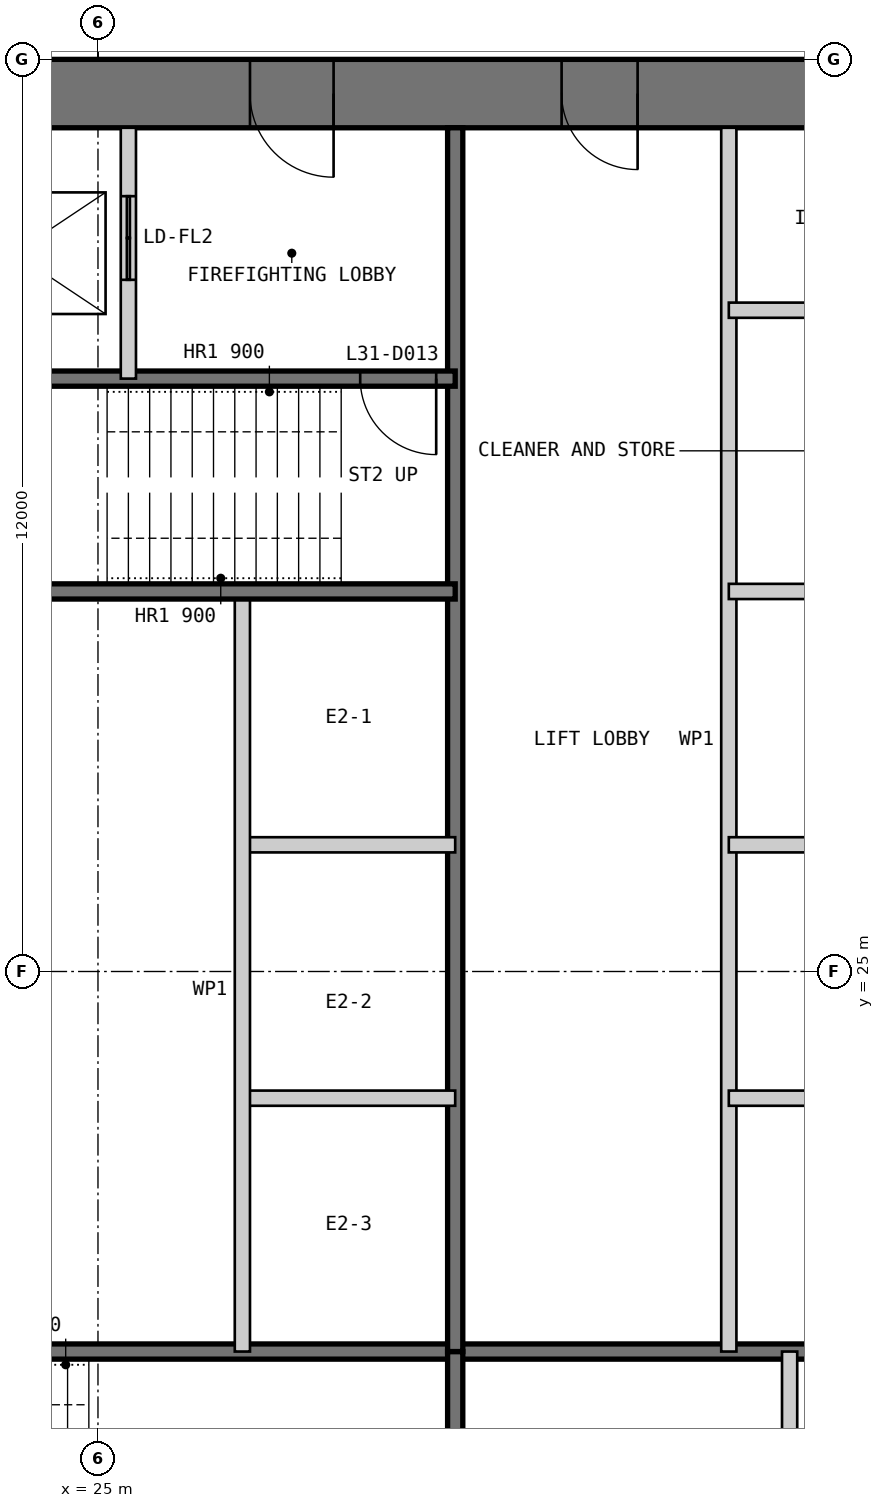
"""IFC4 building model, lengths in metres.
Left out: names, types, materials, properties, quantities, classifications, styles, units other than length and angle.
Written with IfcOpenShell. Run it as: python <this file> out.ifc"""

import sys

from ifc_helpers import new_model, si_unit, direction, frame, frame_2d, origin, place, context, subcontext, project, spatial, polyline, rectangle, outline, extrude, element, fill, save


model = new_model("IFC4")
c1 = context("Model", 3, precision=1e-05, world=origin(), true_north=direction((0.0, 1.0)))
c2 = subcontext(c1, "Body", "Model", "MODEL_VIEW")
j1 = project(units=[si_unit("LENGTHUNIT", "METRE"), si_unit("PLANEANGLEUNIT", "RADIAN")], contexts=[c1])
p1 = place(None, origin())
s1 = spatial("IfcSite", under=j1, at=p1, CompositionType="ELEMENT")
p2 = place(p1, origin())
s2 = spatial("IfcBuilding", under=s1, at=p2, CompositionType="ELEMENT")
p3 = place(p2, frame((0.0, 0.0, 134.4)))
s3 = spatial("IfcBuildingStorey", under=s2, at=p3, CompositionType="ELEMENT", Elevation=134.4)
p4 = place(p3, frame((37.0, 36.55, 0.0), z_axis=(0.0, 0.0, 1.0), x_axis=(-1.0, 0.0, 0.0)))
e1 = element("IfcWall", 1, at=p4, inside=s3, PredefinedType="SHEAR", context=c2, shape_type="SweptSolid", body=[
    extrude(outline(polyline([(0.0, -0.45), (24.0, -0.45), (23.1, 0.45), (0.9, 0.45), (0.0, -0.45)])), origin(), (0.0, 0.0, 1.0), 4.0),
])
p5 = place(p4, frame((4.9, 0.0, 0.0)))
e2 = element("IfcOpeningElement", 2, at=p5, cuts=e1, PredefinedType="OPENING", context=c2, shape_type="SweptSolid", body=[
    extrude(rectangle(XDim=1.0, YDim=2.2, at=frame_2d((0.5, 1.1))), frame((0.0, 0.46, 0.0), z_axis=(0.0, -1.0, 0.0), x_axis=(1.0, 0.0, 0.0)), (0.0, 0.0, 1.0), 0.92),
])
p6 = place(p4, frame((8.9, 0.0, 0.0)))
e3 = element("IfcOpeningElement", 3, at=p6, cuts=e1, PredefinedType="OPENING", context=c2, shape_type="SweptSolid", body=[
    extrude(rectangle(XDim=1.1, YDim=2.2, at=frame_2d((0.55, 1.1))), frame((0.0, 0.46, 0.0), z_axis=(0.0, -1.0, 0.0), x_axis=(1.0, 0.0, 0.0)), (0.0, 0.0, 1.0), 0.92),
])
p7 = place(p4, frame((15.05, 0.0, 0.0)))
e4 = element("IfcOpeningElement", 4, at=p7, cuts=e1, PredefinedType="OPENING", context=c2, shape_type="SweptSolid", body=[
    extrude(rectangle(XDim=0.9, YDim=2.2, at=frame_2d((0.45, 1.1))), frame((0.0, 0.46, 0.0), z_axis=(0.0, -1.0, 0.0), x_axis=(1.0, 0.0, 0.0)), (0.0, 0.0, 1.0), 0.92),
])
p8 = place(p4, frame((17.9, 0.0, 0.0)))
e5 = element("IfcOpeningElement", 5, at=p8, cuts=e1, PredefinedType="OPENING", context=c2, shape_type="SweptSolid", body=[
    extrude(rectangle(XDim=1.0, YDim=2.2, at=frame_2d((0.5, 1.1))), frame((0.0, 0.46, 0.0), z_axis=(0.0, -1.0, 0.0), x_axis=(1.0, 0.0, 0.0)), (0.0, 0.0, 1.0), 0.92),
])
p9 = place(p4, frame((21.4, 0.0, 0.0)))
e6 = element("IfcOpeningElement", 6, at=p9, cuts=e1, PredefinedType="OPENING", context=c2, shape_type="SweptSolid", body=[
    extrude(rectangle(XDim=1.0, YDim=2.2, at=frame_2d((0.5, 1.1))), frame((0.0, 0.46, 0.0), z_axis=(0.0, -1.0, 0.0), x_axis=(1.0, 0.0, 0.0)), (0.0, 0.0, 1.0), 0.92),
])
p10 = place(p3, frame((20.3, 20.0, 0.0), z_axis=(0.0, 0.0, 1.0), x_axis=(1.0, 0.0, 0.0)))
e7 = element("IfcWall", 7, at=p10, inside=s3, PredefinedType="SOLIDWALL", context=c2, shape_type="SweptSolid", body=[
    extrude(rectangle(XDim=15.8, YDim=0.2, at=frame_2d((7.9, 0.0))), origin(), (0.0, 0.0, 1.0), 3.8),
])
p11 = place(p3, frame((29.7, 13.9, 0.0), z_axis=(0.0, 0.0, 1.0), x_axis=(0.0, 1.0, 0.0)))
e8 = element("IfcWall", 8, at=p11, inside=s3, PredefinedType="SOLIDWALL", context=c2, shape_type="SweptSolid", body=[
    extrude(rectangle(XDim=6.1, YDim=0.2, at=frame_2d((3.05, 0.0))), origin(), (0.0, 0.0, 1.0), 3.8),
])
p12 = place(p3, frame((34.1, 13.9, 0.0), z_axis=(0.0, 0.0, 1.0), x_axis=(0.0, 1.0, 0.0)))
e9 = element("IfcWall", 9, at=p12, inside=s3, PredefinedType="PARTITIONING", context=c2, shape_type="SweptSolid", body=[
    extrude(rectangle(XDim=6.1, YDim=0.2, at=frame_2d((3.05, 0.0))), origin(), (0.0, 0.0, 1.0), 3.8),
])
p13 = place(p3, frame((33.3, 36.1, 0.0), z_axis=(0.0, 0.0, 1.0), x_axis=(0.0, -1.0, 0.0)))
e10 = element("IfcWall", 10, at=p13, inside=s3, PredefinedType="PARTITIONING", context=c2, shape_type="SweptSolid", body=[
    extrude(rectangle(XDim=16.1, YDim=0.2, at=frame_2d((8.05, 0.0))), origin(), (0.0, 0.0, 1.0), 3.8),
])
p14 = place(p3, frame((29.7, 36.1, 0.0), z_axis=(0.0, 0.0, 1.0), x_axis=(0.0, -1.0, 0.0)))
e11 = element("IfcWall", 11, at=p14, inside=s3, PredefinedType="SOLIDWALL", context=c2, shape_type="SweptSolid", body=[
    extrude(rectangle(XDim=16.1, YDim=0.2, at=frame_2d((8.05, 0.0))), origin(), (0.0, 0.0, 1.0), 3.8),
])
for number, where, z_axis, x_axis in (
    (12, (36.1, 30.0, 0.0), (0.0, 0.0, 1.0), (-1.0, 0.0, 0.0)),
    (13, (36.1, 26.667, 0.0), (0.0, 0.0, 1.0), (-1.0, 0.0, 0.0)),
    (14, (36.1, 23.333, 0.0), (0.0, 0.0, 1.0), (-1.0, 0.0, 0.0)),
    (15, (29.7, 26.667, 0.0), (0.0, 0.0, 1.0), (-1.0, 0.0, 0.0)),
    (16, (29.7, 23.333, 0.0), (0.0, 0.0, 1.0), (-1.0, 0.0, 0.0)),
):
    element("IfcWall", number, at=place(p3, frame(where, z_axis=z_axis, x_axis=x_axis)), inside=s3, PredefinedType="PARTITIONING", context=c2, shape_type="SweptSolid", body=[
        extrude(rectangle(XDim=2.8, YDim=0.2, at=frame_2d((1.4, 0.0))), origin(), (0.0, 0.0, 1.0), 3.8),
    ])
p15 = place(p3, frame((26.9, 30.0, 0.0), z_axis=(0.0, 0.0, 1.0), x_axis=(0.0, -1.0, 0.0)))
e17 = element("IfcWall", 17, at=p15, inside=s3, PredefinedType="PARTITIONING", context=c2, shape_type="SweptSolid", body=[
    extrude(rectangle(XDim=10.0, YDim=0.2, at=frame_2d((5.0, 0.0))), origin(), (0.0, 0.0, 1.0), 3.8),
])
p16 = place(p3, frame((29.7, 32.8, 0.0), z_axis=(0.0, 0.0, 1.0), x_axis=(-1.0, 0.0, 0.0)))
e18 = element("IfcWall", 18, at=p16, inside=s3, PredefinedType="SOLIDWALL", context=c2, shape_type="SweptSolid", body=[
    extrude(rectangle(XDim=9.4, YDim=0.2, at=frame_2d((4.7, 0.0))), origin(), (0.0, 0.0, 1.0), 3.8),
])
p17 = place(p16, frame((0.25, 0.0, 0.0)))
e19 = element("IfcOpeningElement", 19, at=p17, cuts=e18, PredefinedType="OPENING", context=c2, shape_type="SweptSolid", body=[
    extrude(rectangle(XDim=1.0, YDim=2.2, at=frame_2d((0.5, 1.1))), frame((0.0, 0.11, 0.0), z_axis=(0.0, -1.0, 0.0), x_axis=(1.0, 0.0, 0.0)), (0.0, 0.0, 1.0), 0.22),
])
p18 = place(p3, frame((29.7, 30.0, 0.0), z_axis=(0.0, 0.0, 1.0), x_axis=(-1.0, 0.0, 0.0)))
e20 = element("IfcWall", 20, at=p18, inside=s3, PredefinedType="SOLIDWALL", context=c2, shape_type="SweptSolid", body=[
    extrude(rectangle(XDim=15.8, YDim=0.2, at=frame_2d((7.9, 0.0))), origin(), (0.0, 0.0, 1.0), 3.8),
])
p19 = place(p3, frame((25.4, 36.1, 0.0), z_axis=(0.0, 0.0, 1.0), x_axis=(0.0, -1.0, 0.0)))
e21 = element("IfcWall", 21, at=p19, inside=s3, PredefinedType="PARTITIONING", context=c2, shape_type="SweptSolid", body=[
    extrude(rectangle(XDim=3.3, YDim=0.2, at=frame_2d((1.65, 0.0))), origin(), (0.0, 0.0, 1.0), 3.8),
])
p20 = place(p19, frame((0.9, 0.0, 0.0)))
e22 = element("IfcOpeningElement", 22, at=p20, cuts=e21, PredefinedType="OPENING", context=c2, shape_type="SweptSolid", body=[
    extrude(rectangle(XDim=1.1, YDim=2.2, at=frame_2d((0.55, 1.1))), frame((0.0, 0.11, 0.0), z_axis=(0.0, -1.0, 0.0), x_axis=(1.0, 0.0, 0.0)), (0.0, 0.0, 1.0), 0.22),
])
p21 = place(p3, frame((36.1, 33.7, 0.0), z_axis=(0.0, 0.0, 1.0), x_axis=(-1.0, 0.0, 0.0)))
e23 = element("IfcWall", 23, at=p21, inside=s3, PredefinedType="PARTITIONING", context=c2, shape_type="SweptSolid", body=[
    extrude(rectangle(XDim=2.8, YDim=0.2, at=frame_2d((1.4, 0.0))), origin(), (0.0, 0.0, 1.0), 3.8),
])
p22 = place(p5, origin())
e24 = element("IfcDoor", 24, at=p22, inside=s3, OperationType="SINGLE_SWING_LEFT", PredefinedType="DOOR", context=c2, shape_type="SweptSolid", body=[
    extrude(rectangle(XDim=1.0, YDim=2.2, at=frame_2d((0.5, 1.1))), frame((0.0, 0.025, 0.0), z_axis=(0.0, -1.0, 0.0), x_axis=(1.0, 0.0, 0.0)), (0.0, 0.0, 1.0), 0.05),
    extrude(outline(polyline([(0.0, 0.0), (0.04, 0.0), (0.04, 2.16), (0.96, 2.16), (0.96, 0.0), (1.0, 0.0), (1.0, 2.2), (0.0, 2.2), (0.0, 0.0)])), frame((0.0, 0.3, 0.0), z_axis=(0.0, -1.0, 0.0), x_axis=(1.0, 0.0, 0.0)), (0.0, 0.0, 1.0), 0.6),
])
fill(e2, e24)
p23 = place(p6, origin())
e25 = element("IfcDoor", 25, at=p23, inside=s3, OperationType="SINGLE_SWING_LEFT", PredefinedType="DOOR", context=c2, shape_type="SweptSolid", body=[
    extrude(rectangle(XDim=1.1, YDim=2.2, at=frame_2d((0.55, 1.1))), frame((0.0, 0.025, 0.0), z_axis=(0.0, -1.0, 0.0), x_axis=(1.0, 0.0, 0.0)), (0.0, 0.0, 1.0), 0.05),
    extrude(outline(polyline([(0.0, 0.0), (0.04, 0.0), (0.04, 2.16), (1.06, 2.16), (1.06, 0.0), (1.1, 0.0), (1.1, 2.2), (0.0, 2.2), (0.0, 0.0)])), frame((0.0, 0.3, 0.0), z_axis=(0.0, -1.0, 0.0), x_axis=(1.0, 0.0, 0.0)), (0.0, 0.0, 1.0), 0.6),
])
fill(e3, e25)
p24 = place(p17, origin())
e26 = element("IfcDoor", 26, at=p24, inside=s3, OperationType="SINGLE_SWING_LEFT", PredefinedType="DOOR", context=c2, shape_type="SweptSolid", body=[
    extrude(rectangle(XDim=1.0, YDim=2.2, at=frame_2d((0.5, 1.1))), frame((0.0, 0.025, 0.0), z_axis=(0.0, -1.0, 0.0), x_axis=(1.0, 0.0, 0.0)), (0.0, 0.0, 1.0), 0.05),
])
fill(e19, e26)
p25 = place(p20, origin())
e27 = element("IfcDoor", 27, at=p25, inside=s3, OperationType="DOUBLE_DOOR_SLIDING", PredefinedType="DOOR", context=c2, shape_type="SweptSolid", body=[
    extrude(rectangle(XDim=1.1, YDim=2.2, at=frame_2d((0.55, 1.1))), frame((0.0, 0.025, 0.0), z_axis=(0.0, -1.0, 0.0), x_axis=(1.0, 0.0, 0.0)), (0.0, 0.0, 1.0), 0.05),
])
fill(e22, e27)
save(model, sys.argv[1])
